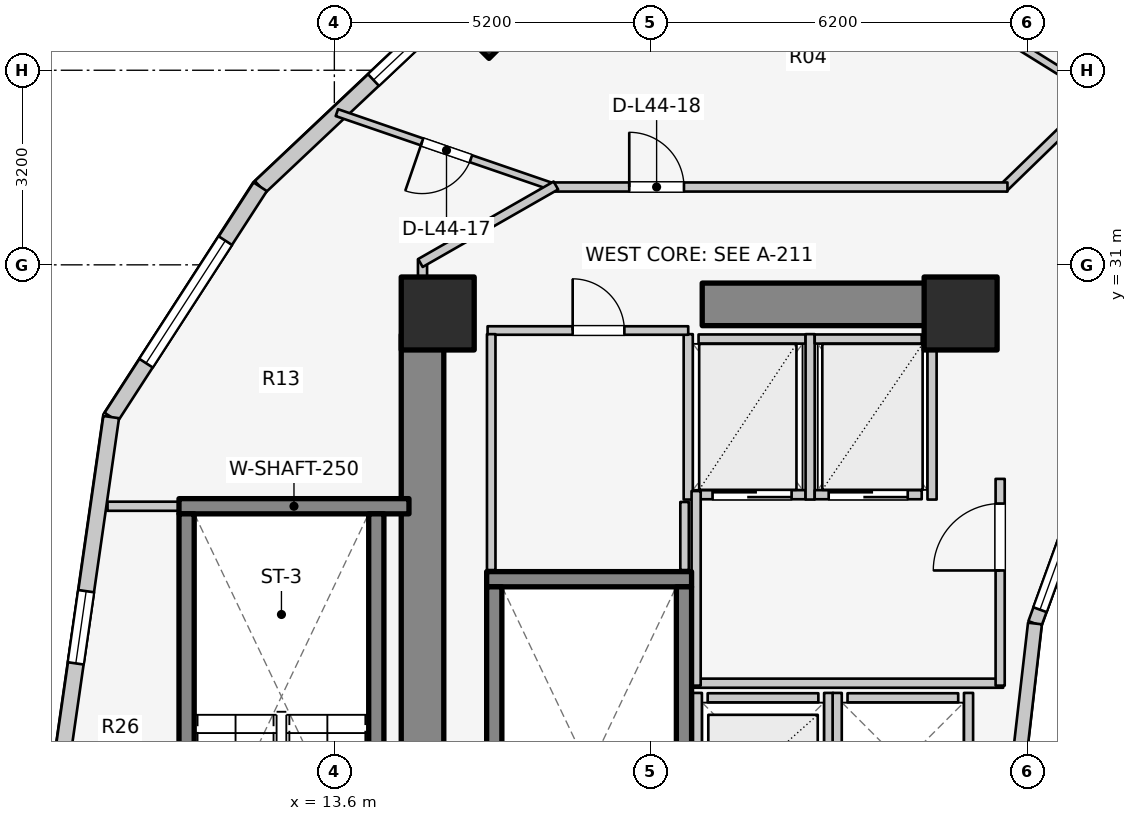
"""IFC4 building model, lengths in metres.
Left out: names, types, materials, properties, quantities, classifications, styles, units other than length and angle.
Written with IfcOpenShell. Run it as: python <this file> out.ifc"""

import sys

from ifc_helpers import new_model, si_unit, direction, frame, frame_2d, origin, origin_2d, place, context, subcontext, project, spatial, rectangle, extrude, element, fill, save


model = new_model("IFC4")
c1 = context("Model", 3, precision=1e-05, world=origin(), true_north=direction((0.0, 1.0)))
c2 = subcontext(c1, "Body", "Model", "MODEL_VIEW")
j1 = project(units=[si_unit("LENGTHUNIT", "METRE"), si_unit("PLANEANGLEUNIT", "RADIAN")], contexts=[c1])
p1 = place(None, origin())
s1 = spatial("IfcSite", under=j1, at=p1, CompositionType="ELEMENT")
p2 = place(p1, origin())
s2 = spatial("IfcBuilding", under=s1, at=p2, CompositionType="ELEMENT")
p3 = place(p2, frame((0.0, 0.0, 146.7)))
s3 = spatial("IfcBuildingStorey", under=s2, at=p3, CompositionType="ELEMENT", Elevation=146.7)
p4 = place(p3, frame((15.05, 17.05, 0.0), z_axis=(0.0, 0.0, 1.0), x_axis=(0.0, 1.0, 0.0)))
e1 = element("IfcWall", 1, at=p4, inside=s3, PredefinedType="SHEAR", context=c2, shape_type="SweptSolid", body=[
    extrude(rectangle(XDim=12.8, YDim=0.7, at=frame_2d((6.4, 0.0))), origin(), (0.0, 0.0, 1.0), 3.1),
])
p5 = place(p3, frame((19.65, 30.35, 0.0), z_axis=(0.0, 0.0, 1.0), x_axis=(1.0, 0.0, 0.0)))
e2 = element("IfcWall", 2, at=p5, inside=s3, PredefinedType="SHEAR", context=c2, shape_type="SweptSolid", body=[
    extrude(rectangle(XDim=4.5, YDim=0.7, at=frame_2d((2.25, 0.0))), origin(), (0.0, 0.0, 1.0), 3.1),
])
p6 = place(p3, frame((16.105, 25.83, 0.0), z_axis=(0.0, 0.0, 1.0), x_axis=(1.0, 0.0, 0.0)))
e3 = element("IfcWall", 3, at=p6, inside=s3, PredefinedType="SOLIDWALL", context=c2, shape_type="SweptSolid", body=[
    extrude(rectangle(XDim=3.37, YDim=0.25, at=frame_2d((1.685, 0.0))), origin(), (0.0, 0.0, 1.0), 3.1),
])
for number, where, z_axis, x_axis in (
    (4, (16.23, 17.895, 0.0), (0.0, 0.0, 1.0), (0.0, 1.0, 0.0)),
    (5, (19.35, 17.895, 0.0), (0.0, 0.0, 1.0), (0.0, 1.0, 0.0)),
):
    element("IfcWall", number, at=place(p3, frame(where, z_axis=z_axis, x_axis=x_axis)), inside=s3, PredefinedType="SOLIDWALL", context=c2, shape_type="SweptSolid", body=[
        extrude(rectangle(XDim=7.81, YDim=0.25, at=frame_2d((3.905, 0.0))), origin(), (0.0, 0.0, 1.0), 3.1),
    ])
p7 = place(p3, frame((11.045, 27.03, 0.0), z_axis=(0.0, 0.0, 1.0), x_axis=(1.0, 0.0, 0.0)))
e6 = element("IfcWall", 6, at=p7, inside=s3, PredefinedType="SOLIDWALL", context=c2, shape_type="SweptSolid", body=[
    extrude(rectangle(XDim=3.782, YDim=0.25, at=frame_2d((1.891, 0.0))), origin(), (0.0, 0.0, 1.0), 3.1),
])
for number, where, z_axis, x_axis in (
    (7, (11.17, 19.095, 0.0), (0.0, 0.0, 1.0), (0.0, 1.0, 0.0)),
    (8, (14.29, 19.095, 0.0), (0.0, 0.0, 1.0), (0.0, 1.0, 0.0)),
):
    element("IfcWall", number, at=place(p3, frame(where, z_axis=z_axis, x_axis=x_axis)), inside=s3, PredefinedType="SOLIDWALL", context=c2, shape_type="SweptSolid", body=[
        extrude(rectangle(XDim=7.81, YDim=0.25, at=frame_2d((3.905, 0.0))), origin(), (0.0, 0.0, 1.0), 3.1),
    ])
for number, where, z_axis, x_axis in (
    (9, (23.9, 30.2, 0.0), (0.0, 0.0, 1.0), (1.0, 0.0, 0.0)),
    (10, (15.3, 30.2, 0.0), (0.0, 0.0, 1.0), (1.0, 0.0, 0.0)),
):
    element("IfcColumn", number, at=place(p3, frame(where, z_axis=z_axis, x_axis=x_axis)), inside=s3, PredefinedType="COLUMN", context=c2, shape_type="SweptSolid", body=[
        extrude(rectangle(XDim=1.2, YDim=1.2, at=origin_2d()), origin(), (0.0, 0.0, 1.0), 3.1),
    ])
p8 = place(p3, frame((16.143, 35.031, 0.0), z_axis=(0.0, 0.0, 1.0), x_axis=(-0.707106781187, 0.707106781187, 0.0)))
e11 = element("IfcColumn", 11, at=p8, inside=s3, PredefinedType="COLUMN", context=c2, shape_type="SweptSolid", body=[
    extrude(rectangle(XDim=0.9, YDim=0.9, at=origin_2d()), origin(), (0.0, 0.0, 1.0), 3.1),
])
p9 = place(p3, frame((25.834, 27.06, 0.0), z_axis=(0.0, 0.0, 1.0), x_axis=(-0.341423187295, -0.93990968033, 0.0)))
e12 = element("IfcWall", 12, at=p9, inside=s3, PredefinedType="STANDARD", context=c2, shape_type="SweptSolid", body=[
    extrude(rectangle(XDim=2.084, YDim=0.23, at=frame_2d((1.042, 0.0))), origin(), (0.0, 0.0, 1.0), 2.84),
])
p10 = place(p9, frame((0.242, 0.0, 0.85)))
e13 = element("IfcOpeningElement", 13, at=p10, cuts=e12, PredefinedType="OPENING", context=c2, shape_type="SweptSolid", body=[
    extrude(rectangle(XDim=1.6, YDim=1.65, at=frame_2d((0.8, 0.825))), frame((0.0, 0.125, 0.0), z_axis=(0.0, -1.0, 0.0), x_axis=(1.0, 0.0, 0.0)), (0.0, 0.0, 1.0), 0.25),
])
p11 = place(p3, frame((25.123, 25.102, 0.0), z_axis=(0.0, 0.0, 1.0), x_axis=(-0.114711713601, -0.993398823617, 0.0)))
e14 = element("IfcWall", 14, at=p11, inside=s3, PredefinedType="STANDARD", context=c2, shape_type="SweptSolid", body=[
    extrude(rectangle(XDim=2.115, YDim=0.23, at=frame_2d((1.058, 0.0))), origin(), (0.0, 0.0, 1.0), 2.84),
])
p12 = place(p3, frame((15.731, 35.441, 0.0), z_axis=(0.0, 0.0, 1.0), x_axis=(-0.727667301037, -0.68593024354, 0.0)))
e15 = element("IfcWall", 15, at=p12, inside=s3, PredefinedType="STANDARD", context=c2, shape_type="SweptSolid", body=[
    extrude(rectangle(XDim=4.604, YDim=0.26, at=frame_2d((2.302, 0.0))), origin(), (0.0, 0.0, 1.0), 2.85),
])
p13 = place(p12, frame((0.844, 0.0, 0.75)))
e16 = element("IfcOpeningElement", 16, at=p13, cuts=e15, PredefinedType="OPENING", context=c2, shape_type="SweptSolid", body=[
    extrude(rectangle(XDim=1.2, YDim=1.5, at=frame_2d((0.6, 0.75))), frame((0.0, 0.14, 0.0), z_axis=(0.0, -1.0, 0.0), x_axis=(1.0, 0.0, 0.0)), (0.0, 0.0, 1.0), 0.28),
])
p14 = place(p3, frame((12.381, 32.284, 0.0), z_axis=(0.0, 0.0, 1.0), x_axis=(-0.543358984534, -0.839500454989, 0.0)))
e17 = element("IfcWall", 17, at=p14, inside=s3, PredefinedType="STANDARD", context=c2, shape_type="SweptSolid", body=[
    extrude(rectangle(XDim=4.511, YDim=0.26, at=frame_2d((2.256, 0.0))), origin(), (0.0, 0.0, 1.0), 2.85),
])
p15 = place(p14, frame((1.056, 0.0, 0.75)))
e18 = element("IfcOpeningElement", 18, at=p15, cuts=e17, PredefinedType="OPENING", context=c2, shape_type="SweptSolid", body=[
    extrude(rectangle(XDim=2.4, YDim=1.7, at=frame_2d((1.2, 0.85))), frame((0.0, 0.14, 0.0), z_axis=(0.0, -1.0, 0.0), x_axis=(1.0, 0.0, 0.0)), (0.0, 0.0, 1.0), 0.28),
])
p16 = place(p3, frame((9.93, 28.497, 0.0), z_axis=(0.0, 0.0, 1.0), x_axis=(-0.142227632286, -0.989833976288, 0.0)))
e19 = element("IfcWall", 19, at=p16, inside=s3, PredefinedType="STANDARD", context=c2, shape_type="SweptSolid", body=[
    extrude(rectangle(XDim=5.553, YDim=0.26, at=frame_2d((2.776, 0.0))), origin(), (0.0, 0.0, 1.0), 2.85),
])
p17 = place(p16, frame((2.892, 0.0, 0.75)))
e20 = element("IfcOpeningElement", 20, at=p17, cuts=e19, PredefinedType="OPENING", context=c2, shape_type="SweptSolid", body=[
    extrude(rectangle(XDim=1.2, YDim=1.5, at=frame_2d((0.6, 0.75))), frame((0.0, 0.14, 0.0), z_axis=(0.0, -1.0, 0.0), x_axis=(1.0, 0.0, 0.0)), (0.0, 0.0, 1.0), 0.28),
])
p18 = place(p3, frame((19.74, 23.88, 0.0), z_axis=(0.0, 0.0, 1.0), x_axis=(1.0, 0.0, 0.0)))
e21 = element("IfcWall", 21, at=p18, inside=s3, PredefinedType="SOLIDWALL", context=c2, shape_type="SweptSolid", body=[
    extrude(rectangle(XDim=1.82, YDim=0.15, at=frame_2d((0.91, 0.0))), origin(), (0.0, 0.0, 1.0), 2.855),
])
for number, where, z_axis, x_axis in (
    (22, (19.57, 21.64, 0.0), (0.0, 0.0, 1.0), (0.0, 1.0, 0.0)),
    (23, (21.73, 21.64, 0.0), (0.0, 0.0, 1.0), (0.0, 1.0, 0.0)),
):
    element("IfcWall", number, at=place(p3, frame(where, z_axis=z_axis, x_axis=x_axis)), inside=s3, PredefinedType="SOLIDWALL", context=c2, shape_type="SweptSolid", body=[
        extrude(rectangle(XDim=2.32, YDim=0.15, at=frame_2d((1.16, 0.0))), origin(), (0.0, 0.0, 1.0), 2.855),
    ])
p19 = place(p3, frame((22.04, 23.88, 0.0), z_axis=(0.0, 0.0, 1.0), x_axis=(1.0, 0.0, 0.0)))
e24 = element("IfcWall", 24, at=p19, inside=s3, PredefinedType="SOLIDWALL", context=c2, shape_type="SweptSolid", body=[
    extrude(rectangle(XDim=1.82, YDim=0.15, at=frame_2d((0.91, 0.0))), origin(), (0.0, 0.0, 1.0), 2.12),
])
p20 = place(p3, frame((21.87, 21.64, 0.0), z_axis=(0.0, 0.0, 1.0), x_axis=(0.0, 1.0, 0.0)))
e25 = element("IfcWall", 25, at=p20, inside=s3, PredefinedType="SOLIDWALL", context=c2, shape_type="SweptSolid", body=[
    extrude(rectangle(XDim=2.32, YDim=0.15, at=frame_2d((1.16, 0.0))), origin(), (0.0, 0.0, 1.0), 2.855),
])
p21 = place(p3, frame((24.03, 21.64, 0.0), z_axis=(0.0, 0.0, 1.0), x_axis=(0.0, 1.0, 0.0)))
e26 = element("IfcWall", 26, at=p21, inside=s3, PredefinedType="SOLIDWALL", context=c2, shape_type="SweptSolid", body=[
    extrude(rectangle(XDim=2.32, YDim=0.15, at=frame_2d((1.16, 0.0))), origin(), (0.0, 0.0, 1.0), 2.12),
])
p22 = place(p3, frame((19.59, 27.22, 0.0), z_axis=(0.0, 0.0, 1.0), x_axis=(1.0, 0.0, 0.0)))
e27 = element("IfcWall", 27, at=p22, inside=s3, PredefinedType="SOLIDWALL", context=c2, shape_type="SweptSolid", body=[
    extrude(rectangle(XDim=1.76, YDim=0.15, at=frame_2d((0.88, 0.0))), origin(), (0.0, 0.0, 1.0), 2.855),
])
p23 = place(p22, frame((0.23, 0.0, 0.0)))
e28 = element("IfcOpeningElement", 28, at=p23, cuts=e27, PredefinedType="OPENING", context=c2, shape_type="SweptSolid", body=[
    extrude(rectangle(XDim=1.3, YDim=2.1, at=frame_2d((0.65, 1.05))), frame((0.0, 0.085, 0.0), z_axis=(0.0, -1.0, 0.0), x_axis=(1.0, 0.0, 0.0)), (0.0, 0.0, 1.0), 0.17),
])
p24 = place(p3, frame((19.59, 29.78, 0.0), z_axis=(0.0, 0.0, 1.0), x_axis=(1.0, 0.0, 0.0)))
e29 = element("IfcWall", 29, at=p24, inside=s3, PredefinedType="SOLIDWALL", context=c2, shape_type="SweptSolid", body=[
    extrude(rectangle(XDim=1.76, YDim=0.15, at=frame_2d((0.88, 0.0))), origin(), (0.0, 0.0, 1.0), 2.855),
])
for number, where, z_axis, x_axis in (
    (30, (19.42, 27.14, 0.0), (0.0, 0.0, 1.0), (0.0, 1.0, 0.0)),
    (31, (21.425, 27.14, 0.0), (0.0, 0.0, 1.0), (0.0, 1.0, 0.0)),
):
    element("IfcWall", number, at=place(p3, frame(where, z_axis=z_axis, x_axis=x_axis)), inside=s3, PredefinedType="SOLIDWALL", context=c2, shape_type="SweptSolid", body=[
        extrude(rectangle(XDim=2.72, YDim=0.15, at=frame_2d((1.36, 0.0))), origin(), (0.0, 0.0, 1.0), 2.855),
    ])
p25 = place(p3, frame((21.5, 27.22, 0.0), z_axis=(0.0, 0.0, 1.0), x_axis=(1.0, 0.0, 0.0)))
e32 = element("IfcWall", 32, at=p25, inside=s3, PredefinedType="SOLIDWALL", context=c2, shape_type="SweptSolid", body=[
    extrude(rectangle(XDim=1.76, YDim=0.15, at=frame_2d((0.88, 0.0))), origin(), (0.0, 0.0, 1.0), 2.855),
])
p26 = place(p25, frame((0.23, 0.0, 0.0)))
e33 = element("IfcOpeningElement", 33, at=p26, cuts=e32, PredefinedType="OPENING", context=c2, shape_type="SweptSolid", body=[
    extrude(rectangle(XDim=1.3, YDim=2.1, at=frame_2d((0.65, 1.05))), frame((0.0, 0.085, 0.0), z_axis=(0.0, -1.0, 0.0), x_axis=(1.0, 0.0, 0.0)), (0.0, 0.0, 1.0), 0.17),
])
p27 = place(p3, frame((21.5, 29.78, 0.0), z_axis=(0.0, 0.0, 1.0), x_axis=(1.0, 0.0, 0.0)))
e34 = element("IfcWall", 34, at=p27, inside=s3, PredefinedType="SOLIDWALL", context=c2, shape_type="SweptSolid", body=[
    extrude(rectangle(XDim=1.76, YDim=0.15, at=frame_2d((0.88, 0.0))), origin(), (0.0, 0.0, 1.0), 2.855),
])
p28 = place(p3, frame((23.43, 27.14, 0.0), z_axis=(0.0, 0.0, 1.0), x_axis=(0.0, 1.0, 0.0)))
e35 = element("IfcWall", 35, at=p28, inside=s3, PredefinedType="SOLIDWALL", context=c2, shape_type="SweptSolid", body=[
    extrude(rectangle(XDim=2.72, YDim=0.15, at=frame_2d((1.36, 0.0))), origin(), (0.0, 0.0, 1.0), 2.855),
])
p29 = place(p3, frame((19.52, 24.12, 0.0), z_axis=(0.0, 0.0, 1.0), x_axis=(1.0, 0.0, 0.0)))
e36 = element("IfcWall", 36, at=p29, inside=s3, PredefinedType="PARTITIONING", context=c2, shape_type="SweptSolid", body=[
    extrude(rectangle(XDim=5.08, YDim=0.15, at=frame_2d((2.54, 0.0))), origin(), (0.0, 0.0, 1.0), 2.12),
])
p30 = place(p3, frame((19.55, 24.08, 0.0), z_axis=(0.0, 0.0, 1.0), x_axis=(0.0, 1.0, 0.0)))
e37 = element("IfcWall", 37, at=p30, inside=s3, PredefinedType="PARTITIONING", context=c2, shape_type="SweptSolid", body=[
    extrude(rectangle(XDim=3.2, YDim=0.15, at=frame_2d((1.6, 0.0))), origin(), (0.0, 0.0, 1.0), 2.855),
])
p31 = place(p3, frame((24.55, 24.08, 0.0), z_axis=(0.0, 0.0, 1.0), x_axis=(0.0, 1.0, 0.0)))
e38 = element("IfcWall", 38, at=p31, inside=s3, PredefinedType="PARTITIONING", context=c2, shape_type="SweptSolid", body=[
    extrude(rectangle(XDim=3.4, YDim=0.15, at=frame_2d((1.7, 0.0))), origin(), (0.0, 0.0, 1.0), 2.855),
])
p32 = place(p31, frame((1.894, 0.0, 0.0)))
e39 = element("IfcOpeningElement", 39, at=p32, cuts=e38, PredefinedType="OPENING", context=c2, shape_type="SweptSolid", body=[
    extrude(rectangle(XDim=1.1, YDim=2.1, at=frame_2d((0.55, 1.05))), frame((0.0, 0.085, 0.0), z_axis=(0.0, -1.0, 0.0), x_axis=(1.0, 0.0, 0.0)), (0.0, 0.0, 1.0), 0.17),
])
p33 = place(p3, frame((16.12, 29.92, 0.0), z_axis=(0.0, 0.0, 1.0), x_axis=(1.0, 0.0, 0.0)))
e40 = element("IfcWall", 40, at=p33, inside=s3, PredefinedType="PLUMBINGWALL", context=c2, shape_type="SweptSolid", body=[
    extrude(rectangle(XDim=3.3, YDim=0.14, at=frame_2d((1.65, 0.0))), origin(), (0.0, 0.0, 1.0), 2.855),
])
p34 = place(p33, frame((1.399, 0.0, 0.0)))
e41 = element("IfcOpeningElement", 41, at=p34, cuts=e40, PredefinedType="OPENING", context=c2, shape_type="SweptSolid", body=[
    extrude(rectangle(XDim=0.85, YDim=2.05, at=frame_2d((0.425, 1.025))), frame((0.0, 0.08, 0.0), z_axis=(0.0, -1.0, 0.0), x_axis=(1.0, 0.0, 0.0)), (0.0, 0.0, 1.0), 0.16),
])
p35 = place(p3, frame((16.18, 25.98, 0.0), z_axis=(0.0, 0.0, 1.0), x_axis=(0.0, 1.0, 0.0)))
e42 = element("IfcWall", 42, at=p35, inside=s3, PredefinedType="PLUMBINGWALL", context=c2, shape_type="SweptSolid", body=[
    extrude(rectangle(XDim=3.88, YDim=0.14, at=frame_2d((1.94, 0.0))), origin(), (0.0, 0.0, 1.0), 2.855),
])
p36 = place(p3, frame((19.36, 25.98, 0.0), z_axis=(0.0, 0.0, 1.0), x_axis=(0.0, 1.0, 0.0)))
e43 = element("IfcWall", 43, at=p36, inside=s3, PredefinedType="PLUMBINGWALL", context=c2, shape_type="SweptSolid", body=[
    extrude(rectangle(XDim=1.12, YDim=0.14, at=frame_2d((0.56, 0.0))), origin(), (0.0, 0.0, 1.0), 2.855),
])
p37 = place(p3, frame((9.87, 27.03, 0.0), z_axis=(0.0, 0.0, 1.0), x_axis=(1.0, 0.0, 0.0)))
e44 = element("IfcWall", 44, at=p37, inside=s3, PredefinedType="PARTITIONING", context=c2, shape_type="SweptSolid", body=[
    extrude(rectangle(XDim=1.17, YDim=0.15, at=frame_2d((0.585, 0.0))), origin(), (0.0, 0.0, 1.0), 2.855),
])
p38 = place(p3, frame((15.05, 29.8, 0.0), z_axis=(0.0, 0.0, 1.0), x_axis=(0.0, 1.0, 0.0)))
e45 = element("IfcWall", 45, at=p38, inside=s3, PredefinedType="PARTITIONING", context=c2, shape_type="SweptSolid", body=[
    extrude(rectangle(XDim=1.29, YDim=0.15, at=frame_2d((0.645, 0.0))), origin(), (0.0, 0.0, 1.0), 2.855),
])
p39 = place(p3, frame((17.247, 32.264, 0.0), z_axis=(0.0, 0.0, 1.0), x_axis=(-0.945683523506, 0.325088716151, 0.0)))
e46 = element("IfcWall", 46, at=p39, inside=s3, PredefinedType="MOVABLE", context=c2, shape_type="SweptSolid", body=[
    extrude(rectangle(XDim=3.813, YDim=0.12, at=frame_2d((1.906, 0.0))), origin(), (0.0, 0.0, 1.0), 2.22),
])
p40 = place(p39, frame((1.481, 0.0, 0.0)))
e47 = element("IfcOpeningElement", 47, at=p40, cuts=e46, PredefinedType="OPENING", context=c2, shape_type="SweptSolid", body=[
    extrude(rectangle(XDim=0.85, YDim=2.05, at=frame_2d((0.425, 1.025))), frame((0.0, 0.07, 0.0), z_axis=(0.0, -1.0, 0.0), x_axis=(1.0, 0.0, 0.0)), (0.0, 0.0, 1.0), 0.14),
])
p41 = place(p3, frame((26.133, 33.749, 0.0), z_axis=(0.0, 0.0, 1.0), x_axis=(-0.717419568599, -0.696641344302, 0.0)))
e48 = element("IfcWall", 48, at=p41, inside=s3, PredefinedType="PARTITIONING", context=c2, shape_type="SweptSolid", body=[
    extrude(rectangle(XDim=2.138, YDim=0.15, at=frame_2d((1.069, 0.0))), origin(), (0.0, 0.0, 1.0), 2.299),
])
p42 = place(p3, frame((17.15, 32.28, 0.0), z_axis=(0.0, 0.0, 1.0), x_axis=(1.0, 0.0, 0.0)))
e49 = element("IfcWall", 49, at=p42, inside=s3, PredefinedType="PARTITIONING", context=c2, shape_type="SweptSolid", body=[
    extrude(rectangle(XDim=7.52, YDim=0.15, at=frame_2d((3.76, 0.0))), origin(), (0.0, 0.0, 1.0), 2.299),
])
p43 = place(p42, frame((1.3, 0.0, 0.0)))
e50 = element("IfcOpeningElement", 50, at=p43, cuts=e49, PredefinedType="OPENING", context=c2, shape_type="SweptSolid", body=[
    extrude(rectangle(XDim=0.9, YDim=2.1, at=frame_2d((0.45, 1.05))), frame((0.0, 0.085, 0.0), z_axis=(0.0, -1.0, 0.0), x_axis=(1.0, 0.0, 0.0)), (0.0, 0.0, 1.0), 0.17),
])
p44 = place(p3, frame((17.243, 32.305, 0.0), z_axis=(0.0, 0.0, 1.0), x_axis=(-0.867991349648, -0.496579315857, 0.0)))
e51 = element("IfcWall", 51, at=p44, inside=s3, PredefinedType="PARTITIONING", context=c2, shape_type="SweptSolid", body=[
    extrude(rectangle(XDim=2.567, YDim=0.15, at=frame_2d((1.283, 0.0))), origin(), (0.0, 0.0, 1.0), 2.22),
])
p45 = place(p3, frame((26.125, 33.816, 0.0), z_axis=(0.0, 0.0, 1.0), x_axis=(-0.849008457073, 0.528379257559, 0.0)))
e52 = element("IfcWall", 52, at=p45, inside=s3, PredefinedType="PARTITIONING", context=c2, shape_type="SweptSolid", body=[
    extrude(rectangle(XDim=7.077, YDim=0.125, at=frame_2d((3.539, 0.0))), origin(), (0.0, 0.0, 1.0), 2.299),
])
p46 = place(p10, origin())
e53 = element("IfcWindow", 53, at=p46, inside=s3, PartitioningType="SINGLE_PANEL", PredefinedType="WINDOW", context=c2, shape_type="SweptSolid", body=[
    extrude(rectangle(XDim=1.6, YDim=1.65, at=frame_2d((0.8, 0.825))), frame((0.0, 0.03, 0.0), z_axis=(0.0, -1.0, 0.0), x_axis=(1.0, 0.0, 0.0)), (0.0, 0.0, 1.0), 0.06),
])
fill(e13, e53)
p47 = place(p13, origin())
e54 = element("IfcWindow", 54, at=p47, inside=s3, PartitioningType="SINGLE_PANEL", PredefinedType="WINDOW", context=c2, shape_type="SweptSolid", body=[
    extrude(rectangle(XDim=1.2, YDim=1.5, at=frame_2d((0.6, 0.75))), frame((0.0, 0.03, 0.0), z_axis=(0.0, -1.0, 0.0), x_axis=(1.0, 0.0, 0.0)), (0.0, 0.0, 1.0), 0.06),
])
fill(e16, e54)
p48 = place(p15, origin())
e55 = element("IfcWindow", 55, at=p48, inside=s3, PartitioningType="SINGLE_PANEL", PredefinedType="WINDOW", context=c2, shape_type="SweptSolid", body=[
    extrude(rectangle(XDim=2.4, YDim=1.7, at=frame_2d((1.2, 0.85))), frame((0.0, 0.03, 0.0), z_axis=(0.0, -1.0, 0.0), x_axis=(1.0, 0.0, 0.0)), (0.0, 0.0, 1.0), 0.06),
])
fill(e18, e55)
p49 = place(p17, origin())
e56 = element("IfcWindow", 56, at=p49, inside=s3, PartitioningType="SINGLE_PANEL", PredefinedType="WINDOW", context=c2, shape_type="SweptSolid", body=[
    extrude(rectangle(XDim=1.2, YDim=1.5, at=frame_2d((0.6, 0.75))), frame((0.0, 0.03, 0.0), z_axis=(0.0, -1.0, 0.0), x_axis=(1.0, 0.0, 0.0)), (0.0, 0.0, 1.0), 0.06),
])
fill(e20, e56)
p50 = place(p23, origin())
e57 = element("IfcDoor", 57, at=p50, inside=s3, OperationType="DOUBLE_DOOR_SLIDING", PredefinedType="DOOR", context=c2, shape_type="SweptSolid", body=[
    extrude(rectangle(XDim=1.3, YDim=2.1, at=frame_2d((0.65, 1.05))), frame((0.0, 0.025, 0.0), z_axis=(0.0, -1.0, 0.0), x_axis=(1.0, 0.0, 0.0)), (0.0, 0.0, 1.0), 0.05),
])
fill(e28, e57)
p51 = place(p26, origin())
e58 = element("IfcDoor", 58, at=p51, inside=s3, OperationType="DOUBLE_DOOR_SLIDING", PredefinedType="DOOR", context=c2, shape_type="SweptSolid", body=[
    extrude(rectangle(XDim=1.3, YDim=2.1, at=frame_2d((0.65, 1.05))), frame((0.0, 0.025, 0.0), z_axis=(0.0, -1.0, 0.0), x_axis=(1.0, 0.0, 0.0)), (0.0, 0.0, 1.0), 0.05),
])
fill(e33, e58)
p52 = place(p32, origin())
e59 = element("IfcDoor", 59, at=p52, inside=s3, OperationType="SINGLE_SWING_LEFT", PredefinedType="DOOR", context=c2, shape_type="SweptSolid", body=[
    extrude(rectangle(XDim=1.1, YDim=2.1, at=frame_2d((0.55, 1.05))), frame((0.0, 0.025, 0.0), z_axis=(0.0, -1.0, 0.0), x_axis=(1.0, 0.0, 0.0)), (0.0, 0.0, 1.0), 0.05),
])
fill(e39, e59)
p53 = place(p34, origin())
e60 = element("IfcDoor", 60, at=p53, inside=s3, OperationType="SINGLE_SWING_LEFT", PredefinedType="DOOR", context=c2, shape_type="SweptSolid", body=[
    extrude(rectangle(XDim=0.85, YDim=2.05, at=frame_2d((0.425, 1.025))), frame((0.0, 0.025, 0.0), z_axis=(0.0, -1.0, 0.0), x_axis=(1.0, 0.0, 0.0)), (0.0, 0.0, 1.0), 0.05),
])
fill(e41, e60)
p54 = place(p40, origin())
e61 = element("IfcDoor", 61, at=p54, inside=s3, OperationType="SINGLE_SWING_RIGHT", PredefinedType="DOOR", context=c2, shape_type="SweptSolid", body=[
    extrude(rectangle(XDim=0.85, YDim=2.05, at=frame_2d((0.425, 1.025))), frame((0.0, 0.025, 0.0), z_axis=(0.0, -1.0, 0.0), x_axis=(1.0, 0.0, 0.0)), (0.0, 0.0, 1.0), 0.05),
])
fill(e47, e61)
p55 = place(p43, origin())
e62 = element("IfcDoor", 62, at=p55, inside=s3, OperationType="SINGLE_SWING_LEFT", PredefinedType="DOOR", context=c2, shape_type="SweptSolid", body=[
    extrude(rectangle(XDim=0.9, YDim=2.1, at=frame_2d((0.45, 1.05))), frame((0.0, 0.025, 0.0), z_axis=(0.0, -1.0, 0.0), x_axis=(1.0, 0.0, 0.0)), (0.0, 0.0, 1.0), 0.05),
])
fill(e50, e62)
save(model, sys.argv[1])
